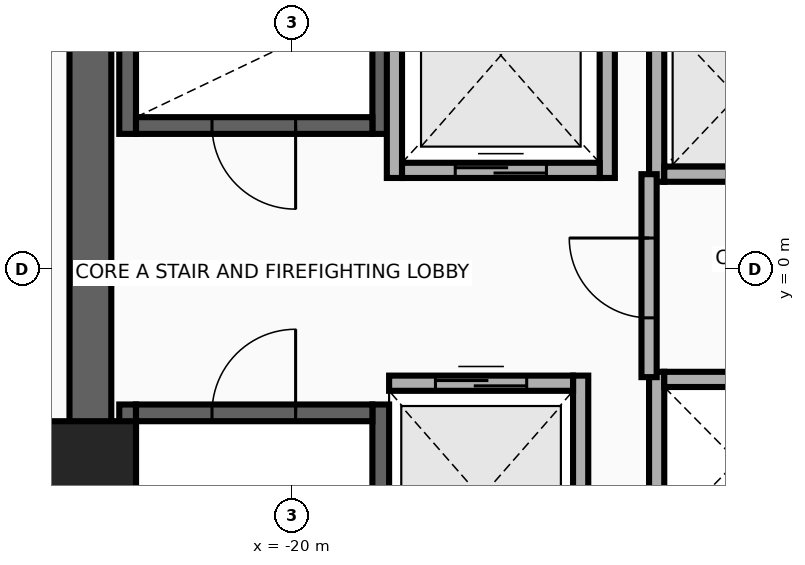
"""IFC4 building model, lengths in metres.
Left out: names, types, materials, properties, quantities, classifications, styles, units other than length and angle.
Written with IfcOpenShell. Run it as: python <this file> out.ifc"""

import sys

from ifc_helpers import new_model, si_unit, direction, frame, frame_2d, origin, origin_2d, place, context, subcontext, project, spatial, rectangle, extrude, source, transform, mapped, element, fill, save


model = new_model("IFC4")
c1 = context("Model", 3, precision=1e-05, world=origin(), true_north=direction((0.0, 1.0)))
c2 = subcontext(c1, "Body", "Model", "MODEL_VIEW")
j1 = project(units=[si_unit("LENGTHUNIT", "METRE"), si_unit("PLANEANGLEUNIT", "RADIAN")], contexts=[c1])
p1 = place(None, origin())
s1 = spatial("IfcSite", under=j1, at=p1, CompositionType="ELEMENT")
p2 = place(p1, origin())
s2 = spatial("IfcBuilding", under=s1, at=p2, CompositionType="ELEMENT")
p3 = place(p2, frame((0.0, 0.0, 161.2)))
s3 = spatial("IfcBuildingStorey", under=s2, at=p3, CompositionType="ELEMENT", Elevation=161.2)
for number, where, z_axis, x_axis in (
    (1, (-22.16, 1.78, 0.0), (0.0, 0.0, 1.0), (0.0, 1.0, 0.0)),
    (2, (-18.83, 1.78, 0.0), (0.0, 0.0, 1.0), (0.0, 1.0, 0.0)),
):
    element("IfcWall", number, at=place(p3, frame(where, z_axis=z_axis, x_axis=x_axis)), inside=s3, PredefinedType="SHEAR", context=c2, shape_type="SweptSolid", body=[
        extrude(rectangle(XDim=8.745, YDim=0.22, at=frame_2d((4.373, 0.0))), origin(), (0.0, 0.0, 1.0), 3.46),
    ])
p4 = place(p3, frame((-22.05, 1.89, 0.0), z_axis=(0.0, 0.0, 1.0), x_axis=(1.0, 0.0, 0.0)))
e3 = element("IfcWall", 3, at=p4, inside=s3, PredefinedType="SHEAR", context=c2, shape_type="SweptSolid", body=[
    extrude(rectangle(XDim=3.11, YDim=0.22, at=frame_2d((1.555, 0.0))), origin(), (0.0, 0.0, 1.0), 3.46),
])
p5 = place(p4, frame((1.0, 0.0, 0.0)))
e4 = element("IfcOpeningElement", 4, at=p5, cuts=e3, PredefinedType="OPENING", context=c2, shape_type="SweptSolid", body=[
    extrude(rectangle(XDim=1.1, YDim=2.15, at=frame_2d((0.55, 1.075))), frame((0.0, 0.125, 0.0), z_axis=(0.0, -1.0, 0.0), x_axis=(1.0, 0.0, 0.0)), (0.0, 0.0, 1.0), 0.25),
])
for number, where, z_axis, x_axis in (
    (5, (-22.16, -10.525, 0.0), (0.0, 0.0, 1.0), (0.0, 1.0, 0.0)),
    (6, (-18.83, -10.525, 0.0), (0.0, 0.0, 1.0), (0.0, 1.0, 0.0)),
):
    element("IfcWall", number, at=place(p3, frame(where, z_axis=z_axis, x_axis=x_axis)), inside=s3, PredefinedType="SHEAR", context=c2, shape_type="SweptSolid", body=[
        extrude(rectangle(XDim=8.745, YDim=0.22, at=frame_2d((4.373, 0.0))), origin(), (0.0, 0.0, 1.0), 3.46),
    ])
p6 = place(p3, frame((-22.05, -1.89, 0.0), z_axis=(0.0, 0.0, 1.0), x_axis=(1.0, 0.0, 0.0)))
e7 = element("IfcWall", 7, at=p6, inside=s3, PredefinedType="SHEAR", context=c2, shape_type="SweptSolid", body=[
    extrude(rectangle(XDim=3.11, YDim=0.22, at=frame_2d((1.555, 0.0))), origin(), (0.0, 0.0, 1.0), 3.46),
])
p7 = place(p6, frame((1.0, 0.0, 0.0)))
e8 = element("IfcOpeningElement", 8, at=p7, cuts=e7, PredefinedType="OPENING", context=c2, shape_type="SweptSolid", body=[
    extrude(rectangle(XDim=1.1, YDim=2.15, at=frame_2d((0.55, 1.075))), frame((0.0, 0.125, 0.0), z_axis=(0.0, -1.0, 0.0), x_axis=(1.0, 0.0, 0.0)), (0.0, 0.0, 1.0), 0.25),
])
p8 = place(p3, frame((-22.65, -11.075, 0.0), z_axis=(0.0, 0.0, 1.0), x_axis=(0.0, 1.0, 0.0)))
e9 = element("IfcWall", 9, at=p8, inside=s3, PredefinedType="SHEAR", context=c2, shape_type="SweptSolid", body=[
    extrude(rectangle(XDim=22.15, YDim=0.55, at=frame_2d((11.075, 0.0))), origin(), (0.0, 0.0, 1.0), 3.46),
])
m1 = source(origin(), c2, "Body", "SweptSolid", [
    extrude(rectangle(XDim=1.2, YDim=1.2, at=origin_2d()), origin(), (0.0, 0.0, 1.0), 3.7),
])
p9 = place(p3, frame((-22.65, -2.6, 0.0), z_axis=(0.0, 0.0, 1.0), x_axis=(1.0, 0.0, 0.0)))
e10 = element("IfcColumn", 10, at=p9, inside=s3, PredefinedType="COLUMN", context=c2, shape_type="MappedRepresentation", body=[
    mapped(m1, transform((0.0, 0.0, 0.0), x_axis=(1.0, 0.0, 0.0), y_axis=(0.0, 1.0, 0.0), z_axis=(0.0, 0.0, 1.0), scale=1.0)),
])
for number, where, z_axis, x_axis in (
    (11, (-18.65, 1.2, 0.0), (0.0, 0.0, 1.0), (0.0, 1.0, 0.0)),
    (12, (-15.85, 1.2, 0.0), (0.0, 0.0, 1.0), (0.0, 1.0, 0.0)),
):
    element("IfcWall", number, at=place(p3, frame(where, z_axis=z_axis, x_axis=x_axis)), inside=s3, PredefinedType="MOVABLE", context=c2, shape_type="SweptSolid", body=[
        extrude(rectangle(XDim=3.225, YDim=0.2, at=frame_2d((1.613, 0.0))), origin(), (0.0, 0.0, 1.0), 3.46),
    ])
p10 = place(p3, frame((-18.55, 1.3, 0.0), z_axis=(0.0, 0.0, 1.0), x_axis=(1.0, 0.0, 0.0)))
e13 = element("IfcWall", 13, at=p10, inside=s3, PredefinedType="MOVABLE", context=c2, shape_type="SweptSolid", body=[
    extrude(rectangle(XDim=2.6, YDim=0.2, at=frame_2d((1.3, 0.0))), origin(), (0.0, 0.0, 1.0), 3.46),
])
p11 = place(p10, frame((0.7, 0.0, 0.0)))
e14 = element("IfcOpeningElement", 14, at=p11, cuts=e13, PredefinedType="OPENING", context=c2, shape_type="SweptSolid", body=[
    extrude(rectangle(XDim=1.2, YDim=2.1, at=frame_2d((0.6, 1.05))), frame((0.0, 0.115, 0.0), z_axis=(0.0, -1.0, 0.0), x_axis=(1.0, 0.0, 0.0)), (0.0, 0.0, 1.0), 0.23),
])
p12 = place(p3, frame((-16.2, -4.6, 0.0), z_axis=(0.0, 0.0, 1.0), x_axis=(0.0, 1.0, 0.0)))
e15 = element("IfcWall", 15, at=p12, inside=s3, PredefinedType="MOVABLE", context=c2, shape_type="SweptSolid", body=[
    extrude(rectangle(XDim=3.2, YDim=0.2, at=frame_2d((1.6, 0.0))), origin(), (0.0, 0.0, 1.0), 3.46),
])
p13 = place(p3, frame((-18.72, -1.5, 0.0), z_axis=(0.0, 0.0, 1.0), x_axis=(1.0, 0.0, 0.0)))
e16 = element("IfcWall", 16, at=p13, inside=s3, PredefinedType="MOVABLE", context=c2, shape_type="SweptSolid", body=[
    extrude(rectangle(XDim=2.42, YDim=0.2, at=frame_2d((1.21, 0.0))), origin(), (0.0, 0.0, 1.0), 3.46),
])
p14 = place(p13, frame((0.61, 0.0, 0.0)))
e17 = element("IfcOpeningElement", 17, at=p14, cuts=e16, PredefinedType="OPENING", context=c2, shape_type="SweptSolid", body=[
    extrude(rectangle(XDim=1.2, YDim=2.1, at=frame_2d((0.6, 1.05))), frame((0.0, 0.115, 0.0), z_axis=(0.0, -1.0, 0.0), x_axis=(1.0, 0.0, 0.0)), (0.0, 0.0, 1.0), 0.23),
])
p15 = place(p3, frame((-15.2, 1.15, 0.0), z_axis=(0.0, 0.0, 1.0), x_axis=(0.0, 1.0, 0.0)))
e18 = element("IfcWall", 18, at=p15, inside=s3, PredefinedType="MOVABLE", context=c2, shape_type="SweptSolid", body=[
    extrude(rectangle(XDim=2.25, YDim=0.2, at=frame_2d((1.125, 0.0))), origin(), (0.0, 0.0, 1.0), 3.46),
])
p16 = place(p3, frame((-15.1, 1.25, 0.0), z_axis=(0.0, 0.0, 1.0), x_axis=(1.0, 0.0, 0.0)))
e19 = element("IfcWall", 19, at=p16, inside=s3, PredefinedType="MOVABLE", context=c2, shape_type="SweptSolid", body=[
    extrude(rectangle(XDim=1.92, YDim=0.2, at=frame_2d((0.96, 0.0))), origin(), (0.0, 0.0, 1.0), 3.46),
])
p17 = place(p3, frame((-15.2, -3.7, 0.0), z_axis=(0.0, 0.0, 1.0), x_axis=(0.0, 1.0, 0.0)))
e20 = element("IfcWall", 20, at=p17, inside=s3, PredefinedType="MOVABLE", context=c2, shape_type="SweptSolid", body=[
    extrude(rectangle(XDim=2.35, YDim=0.2, at=frame_2d((1.175, 0.0))), origin(), (0.0, 0.0, 1.0), 3.46),
])
p18 = place(p3, frame((-15.1, -1.45, 0.0), z_axis=(0.0, 0.0, 1.0), x_axis=(1.0, 0.0, 0.0)))
e21 = element("IfcWall", 21, at=p18, inside=s3, PredefinedType="MOVABLE", context=c2, shape_type="SweptSolid", body=[
    extrude(rectangle(XDim=1.92, YDim=0.2, at=frame_2d((0.96, 0.0))), origin(), (0.0, 0.0, 1.0), 3.46),
])
p19 = place(p3, frame((-15.3, -1.42, 0.0), z_axis=(0.0, 0.0, 1.0), x_axis=(0.0, 1.0, 0.0)))
e22 = element("IfcWall", 22, at=p19, inside=s3, PredefinedType="PARTITIONING", context=c2, shape_type="SweptSolid", body=[
    extrude(rectangle(XDim=2.67, YDim=0.2, at=frame_2d((1.335, 0.0))), origin(), (0.0, 0.0, 1.0), 3.46),
])
p20 = place(p19, frame((0.78, 0.0, 0.0)))
e23 = element("IfcOpeningElement", 23, at=p20, cuts=e22, PredefinedType="OPENING", context=c2, shape_type="SweptSolid", body=[
    extrude(rectangle(XDim=1.05, YDim=2.15, at=frame_2d((0.525, 1.075))), frame((0.0, 0.115, 0.0), z_axis=(0.0, -1.0, 0.0), x_axis=(1.0, 0.0, 0.0)), (0.0, 0.0, 1.0), 0.23),
])
p21 = place(p11, origin())
e24 = element("IfcDoor", 24, at=p21, inside=s3, OperationType="DOUBLE_DOOR_SLIDING", PredefinedType="DOOR", context=c2, shape_type="SweptSolid", body=[
    extrude(rectangle(XDim=1.2, YDim=2.1, at=frame_2d((0.6, 1.05))), frame((0.0, 0.025, 0.0), z_axis=(0.0, -1.0, 0.0), x_axis=(1.0, 0.0, 0.0)), (0.0, 0.0, 1.0), 0.05),
])
fill(e14, e24)
p22 = place(p14, origin())
e25 = element("IfcDoor", 25, at=p22, inside=s3, OperationType="DOUBLE_DOOR_SLIDING", PredefinedType="DOOR", context=c2, shape_type="SweptSolid", body=[
    extrude(rectangle(XDim=1.2, YDim=2.1, at=frame_2d((0.6, 1.05))), frame((0.0, 0.025, 0.0), z_axis=(0.0, -1.0, 0.0), x_axis=(1.0, 0.0, 0.0)), (0.0, 0.0, 1.0), 0.05),
])
fill(e17, e25)
p23 = place(p20, origin())
e26 = element("IfcDoor", 26, at=p23, inside=s3, OperationType="SINGLE_SWING_RIGHT", PredefinedType="DOOR", context=c2, shape_type="SweptSolid", body=[
    extrude(rectangle(XDim=1.05, YDim=2.15, at=frame_2d((0.525, 1.075))), frame((0.0, 0.025, 0.0), z_axis=(0.0, -1.0, 0.0), x_axis=(1.0, 0.0, 0.0)), (0.0, 0.0, 1.0), 0.05),
])
fill(e23, e26)
p24 = place(p5, frame((1.1, 0.0, 0.0), z_axis=(0.0, 0.0, 1.0), x_axis=(-1.0, 0.0, 0.0)))
e27 = element("IfcDoor", 27, at=p24, inside=s3, OperationType="SINGLE_SWING_LEFT", PredefinedType="DOOR", context=c2, shape_type="SweptSolid", body=[
    extrude(rectangle(XDim=1.1, YDim=2.15, at=frame_2d((0.55, 1.075))), frame((0.0, 0.025, 0.0), z_axis=(0.0, -1.0, 0.0), x_axis=(1.0, 0.0, 0.0)), (0.0, 0.0, 1.0), 0.05),
])
fill(e4, e27)
p25 = place(p7, origin())
e28 = element("IfcDoor", 28, at=p25, inside=s3, OperationType="SINGLE_SWING_RIGHT", PredefinedType="DOOR", context=c2, shape_type="SweptSolid", body=[
    extrude(rectangle(XDim=1.1, YDim=2.15, at=frame_2d((0.55, 1.075))), frame((0.0, 0.025, 0.0), z_axis=(0.0, -1.0, 0.0), x_axis=(1.0, 0.0, 0.0)), (0.0, 0.0, 1.0), 0.05),
])
fill(e8, e28)
save(model, sys.argv[1])
